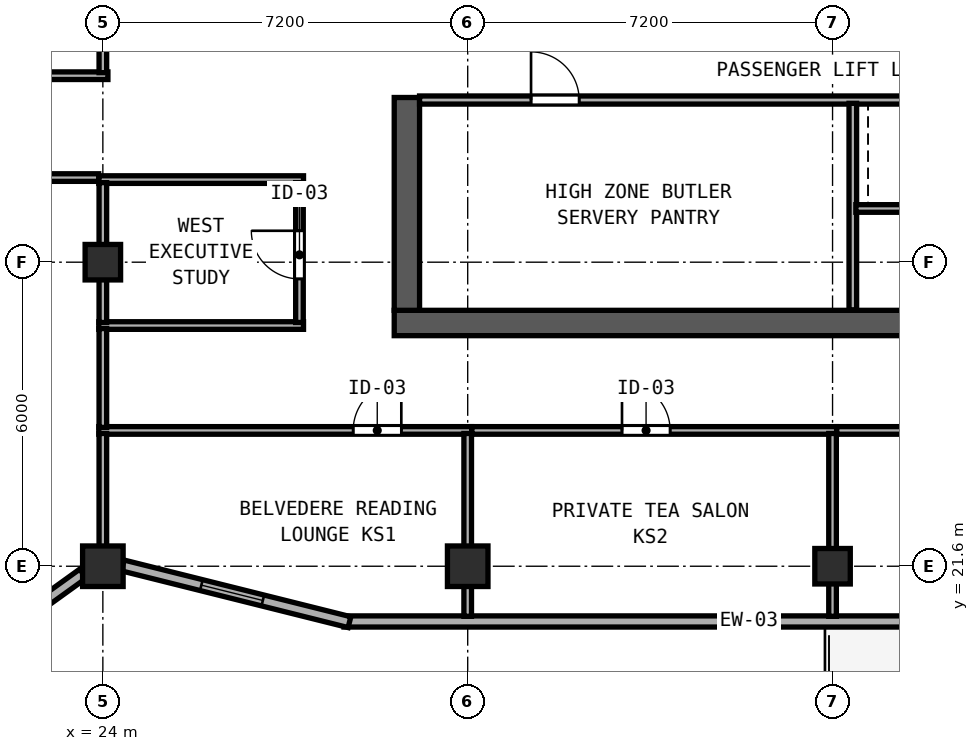
"""IFC4 building model, lengths in metres.
Left out: names, types, materials, properties, quantities, classifications, styles, units other than length and angle.
Written with IfcOpenShell. Run it as: python <this file> out.ifc"""

import sys

from ifc_helpers import new_model, si_unit, direction, frame, frame_2d, origin, origin_2d, place, context, subcontext, project, spatial, rectangle, hollow_rectangle, extrude, element, fill, save


model = new_model("IFC4")
c1 = context("Model", 3, precision=1e-05, world=origin(), true_north=direction((0.0, 1.0)))
c2 = subcontext(c1, "Body", "Model", "MODEL_VIEW")
j1 = project(units=[si_unit("LENGTHUNIT", "METRE"), si_unit("PLANEANGLEUNIT", "RADIAN")], contexts=[c1])
p1 = place(None, origin())
s1 = spatial("IfcSite", under=j1, at=p1, CompositionType="ELEMENT")
p2 = place(p1, origin())
s2 = spatial("IfcBuilding", under=s1, at=p2, CompositionType="ELEMENT")
p3 = place(p2, frame((0.0, 0.0, 235.2)))
s3 = spatial("IfcBuildingStorey", under=s2, at=p3, CompositionType="ELEMENT", Elevation=235.2)
p4 = place(p3, frame((29.75, 26.4, 0.0), z_axis=(0.0, 0.0, 1.0), x_axis=(1.0, 0.0, 0.0)))
e1 = element("IfcWall", 1, at=p4, inside=s3, PredefinedType="SHEAR", context=c2, shape_type="SweptSolid", body=[
    extrude(rectangle(XDim=17.3, YDim=0.5, at=frame_2d((8.65, 0.0))), origin(), (0.0, 0.0, 1.0), 3.67),
])
p5 = place(p4, frame((11.2, 0.0, 0.0), z_axis=(0.0, 0.0, 1.0), x_axis=(-1.0, 0.0, 0.0)))
e2 = element("IfcOpeningElement", 2, at=p5, cuts=e1, PredefinedType="OPENING", context=c2, shape_type="SweptSolid", body=[
    extrude(rectangle(XDim=0.9, YDim=2.1, at=frame_2d((0.45, 1.05))), frame((0.0, 0.26, 0.0), z_axis=(0.0, -1.0, 0.0), x_axis=(1.0, 0.0, 0.0)), (0.0, 0.0, 1.0), 0.52),
])
p6 = place(p3, frame((30.0, 26.65, 0.0), z_axis=(0.0, 0.0, 1.0), x_axis=(0.0, 1.0, 0.0)))
e3 = element("IfcWall", 3, at=p6, inside=s3, PredefinedType="SHEAR", context=c2, shape_type="SweptSolid", body=[
    extrude(rectangle(XDim=4.2, YDim=0.5, at=frame_2d((2.1, 0.0))), origin(), (0.0, 0.0, 1.0), 3.67),
])
for number, where, z_axis, x_axis in (
    (4, (24.0, 21.6, 0.0), (0.0, 0.0, 1.0), (1.0, 0.0, 0.0)),
    (5, (31.2, 21.6, 0.0), (0.0, 0.0, 1.0), (1.0, 0.0, 0.0)),
):
    element("IfcColumn", number, at=place(p3, frame(where, z_axis=z_axis, x_axis=x_axis)), inside=s3, PredefinedType="COLUMN", context=c2, shape_type="SweptSolid", body=[
        extrude(hollow_rectangle(XDim=0.8, YDim=0.8, WallThickness=0.03, at=origin_2d()), origin(), (0.0, 0.0, 1.0), 3.85),
    ])
for number, where, z_axis, x_axis in (
    (6, (24.0, 27.6, 0.0), (0.0, 0.0, 1.0), (1.0, 0.0, 0.0)),
    (7, (38.4, 21.6, 0.0), (0.0, 0.0, 1.0), (1.0, 0.0, 0.0)),
):
    element("IfcColumn", number, at=place(p3, frame(where, z_axis=z_axis, x_axis=x_axis)), inside=s3, PredefinedType="COLUMN", context=c2, shape_type="SweptSolid", body=[
        extrude(hollow_rectangle(XDim=0.7, YDim=0.7, WallThickness=0.026, at=origin_2d()), origin(), (0.0, 0.0, 1.0), 3.85),
    ])
p7 = place(p3, frame((28.759, 20.51, 0.0), z_axis=(0.0, 0.0, 1.0), x_axis=(1.0, 0.0, 0.0)))
e8 = element("IfcWall", 8, at=p7, inside=s3, PredefinedType="SOLIDWALL", context=c2, shape_type="SweptSolid", body=[
    extrude(rectangle(XDim=19.283, YDim=0.22, at=frame_2d((9.642, 0.0))), origin(), (0.0, 0.0, 1.0), 3.67),
])
p8 = place(p7, frame((15.641, 0.0, 0.0), z_axis=(0.0, 0.0, 1.0), x_axis=(-1.0, 0.0, 0.0)))
e9 = element("IfcOpeningElement", 9, at=p8, cuts=e8, PredefinedType="OPENING", context=c2, shape_type="SweptSolid", body=[
    extrude(rectangle(XDim=1.2, YDim=2.15, at=frame_2d((0.6, 1.075))), frame((0.0, 0.12, 0.0), z_axis=(0.0, -1.0, 0.0), x_axis=(1.0, 0.0, 0.0)), (0.0, 0.0, 1.0), 0.24),
])
p9 = place(p3, frame((14.065, 14.583, 0.0), z_axis=(0.0, 0.0, 1.0), x_axis=(0.811523708458, 0.584319493608, 0.0)))
e10 = element("IfcWall", 10, at=p9, inside=s3, PredefinedType="SOLIDWALL", context=c2, shape_type="SweptSolid", body=[
    extrude(rectangle(XDim=11.759, YDim=0.22, at=frame_2d((5.879, 0.0))), origin(), (0.0, 0.0, 1.0), 3.315),
])
p10 = place(p9, frame((1.6, 0.0, 0.85)))
e11 = element("IfcOpeningElement", 11, at=p10, cuts=e10, PredefinedType="OPENING", context=c2, shape_type="SweptSolid", body=[
    extrude(rectangle(XDim=1.25, YDim=1.95, at=frame_2d((0.625, 0.975))), frame((0.0, 0.12, 0.0), z_axis=(0.0, -1.0, 0.0), x_axis=(1.0, 0.0, 0.0)), (0.0, 0.0, 1.0), 0.24),
])
p11 = place(p9, frame((7.0, 0.0, 0.85)))
e12 = element("IfcOpeningElement", 12, at=p11, cuts=e10, PredefinedType="OPENING", context=c2, shape_type="SweptSolid", body=[
    extrude(rectangle(XDim=1.25, YDim=1.95, at=frame_2d((0.625, 0.975))), frame((0.0, 0.12, 0.0), z_axis=(0.0, -1.0, 0.0), x_axis=(1.0, 0.0, 0.0)), (0.0, 0.0, 1.0), 0.24),
])
p12 = place(p3, frame((24.392, 21.615, 0.0), z_axis=(0.0, 0.0, 1.0), x_axis=(0.970133159038, -0.242572986408, 0.0)))
e13 = element("IfcWall", 13, at=p12, inside=s3, PredefinedType="SOLIDWALL", context=c2, shape_type="SweptSolid", body=[
    extrude(rectangle(XDim=4.613, YDim=0.22, at=frame_2d((2.306, 0.0))), origin(), (0.0, 0.0, 1.0), 3.315),
])
p13 = place(p12, frame((1.6, 0.0, 0.85)))
e14 = element("IfcOpeningElement", 14, at=p13, cuts=e13, PredefinedType="OPENING", context=c2, shape_type="SweptSolid", body=[
    extrude(rectangle(XDim=1.25, YDim=1.95, at=frame_2d((0.625, 0.975))), frame((0.0, 0.12, 0.0), z_axis=(0.0, -1.0, 0.0), x_axis=(1.0, 0.0, 0.0)), (0.0, 0.0, 1.0), 0.24),
])
p14 = place(p3, frame((30.25, 30.8, 0.0), z_axis=(0.0, 0.0, 1.0), x_axis=(1.0, 0.0, 0.0)))
e15 = element("IfcWall", 15, at=p14, inside=s3, PredefinedType="SOLIDWALL", context=c2, shape_type="SweptSolid", body=[
    extrude(rectangle(XDim=16.3, YDim=0.16, at=frame_2d((8.15, 0.0))), origin(), (0.0, 0.0, 1.0), 3.67),
])
p15 = place(p14, frame((2.2, 0.0, 0.0)))
e16 = element("IfcOpeningElement", 16, at=p15, cuts=e15, PredefinedType="OPENING", context=c2, shape_type="SweptSolid", body=[
    extrude(rectangle(XDim=0.95, YDim=2.12, at=frame_2d((0.475, 1.06))), frame((0.0, 0.09, 0.0), z_axis=(0.0, -1.0, 0.0), x_axis=(1.0, 0.0, 0.0)), (0.0, 0.0, 1.0), 0.18),
])
p16 = place(p3, frame((38.8, 26.66, 0.0), z_axis=(0.0, 0.0, 1.0), x_axis=(0.0, 1.0, 0.0)))
e17 = element("IfcWall", 17, at=p16, inside=s3, PredefinedType="SOLIDWALL", context=c2, shape_type="SweptSolid", body=[
    extrude(rectangle(XDim=4.075, YDim=0.15, at=frame_2d((2.038, 0.0))), origin(), (0.0, 0.0, 1.0), 3.67),
])
p17 = place(p3, frame((38.86, 28.66, 0.0), z_axis=(0.0, 0.0, 1.0), x_axis=(1.0, 0.0, 0.0)))
e18 = element("IfcWall", 18, at=p17, inside=s3, PredefinedType="PARTITIONING", context=c2, shape_type="SweptSolid", body=[
    extrude(rectangle(XDim=7.69, YDim=0.15, at=frame_2d((3.845, 0.0))), origin(), (0.0, 0.0, 1.0), 3.67),
])
for number, where, z_axis, x_axis in (
    (19, (23.92, 29.23, 0.0), (0.0, 0.0, 1.0), (1.0, 0.0, 0.0)),
    (20, (23.92, 26.35, 0.0), (0.0, 0.0, 1.0), (1.0, 0.0, 0.0)),
):
    element("IfcWall", number, at=place(p3, frame(where, z_axis=z_axis, x_axis=x_axis)), inside=s3, PredefinedType="PARTITIONING", context=c2, shape_type="SweptSolid", body=[
        extrude(rectangle(XDim=4.04, YDim=0.15, at=frame_2d((2.02, 0.0))), origin(), (0.0, 0.0, 1.0), 3.67),
    ])
p18 = place(p3, frame((24.0, 26.41, 0.0), z_axis=(0.0, 0.0, 1.0), x_axis=(0.0, 1.0, 0.0)))
e21 = element("IfcWall", 21, at=p18, inside=s3, PredefinedType="PARTITIONING", context=c2, shape_type="SweptSolid", body=[
    extrude(rectangle(XDim=2.76, YDim=0.15, at=frame_2d((1.38, 0.0))), origin(), (0.0, 0.0, 1.0), 3.315),
])
p19 = place(p3, frame((27.88, 26.41, 0.0), z_axis=(0.0, 0.0, 1.0), x_axis=(0.0, 1.0, 0.0)))
e22 = element("IfcWall", 22, at=p19, inside=s3, PredefinedType="PARTITIONING", context=c2, shape_type="SweptSolid", body=[
    extrude(rectangle(XDim=2.76, YDim=0.15, at=frame_2d((1.38, 0.0))), origin(), (0.0, 0.0, 1.0), 3.67),
])
p20 = place(p19, frame((1.81, 0.0, 0.0), z_axis=(0.0, 0.0, 1.0), x_axis=(-1.0, 0.0, 0.0)))
e23 = element("IfcOpeningElement", 23, at=p20, cuts=e22, PredefinedType="OPENING", context=c2, shape_type="SweptSolid", body=[
    extrude(rectangle(XDim=0.95, YDim=2.12, at=frame_2d((0.475, 1.06))), frame((0.0, 0.085, 0.0), z_axis=(0.0, -1.0, 0.0), x_axis=(1.0, 0.0, 0.0)), (0.0, 0.0, 1.0), 0.17),
])
p21 = place(p3, frame((23.92, 24.28, 0.0), z_axis=(0.0, 0.0, 1.0), x_axis=(1.0, 0.0, 0.0)))
e24 = element("IfcWall", 24, at=p21, inside=s3, PredefinedType="PARTITIONING", context=c2, shape_type="SweptSolid", body=[
    extrude(rectangle(XDim=7.36, YDim=0.15, at=frame_2d((3.68, 0.0))), origin(), (0.0, 0.0, 1.0), 3.67),
])
p22 = place(p21, frame((5.97, 0.0, 0.0), z_axis=(0.0, 0.0, 1.0), x_axis=(-1.0, 0.0, 0.0)))
e25 = element("IfcOpeningElement", 25, at=p22, cuts=e24, PredefinedType="OPENING", context=c2, shape_type="SweptSolid", body=[
    extrude(rectangle(XDim=0.95, YDim=2.12, at=frame_2d((0.475, 1.06))), frame((0.0, 0.085, 0.0), z_axis=(0.0, -1.0, 0.0), x_axis=(1.0, 0.0, 0.0)), (0.0, 0.0, 1.0), 0.17),
])
p23 = place(p3, frame((24.0, 21.819, 0.0), z_axis=(0.0, 0.0, 1.0), x_axis=(0.0, 1.0, 0.0)))
e26 = element("IfcWall", 26, at=p23, inside=s3, PredefinedType="PARTITIONING", context=c2, shape_type="SweptSolid", body=[
    extrude(rectangle(XDim=2.401, YDim=0.15, at=frame_2d((1.201, 0.0))), origin(), (0.0, 0.0, 1.0), 3.315),
])
p24 = place(p3, frame((31.2, 20.612, 0.0), z_axis=(0.0, 0.0, 1.0), x_axis=(0.0, 1.0, 0.0)))
e27 = element("IfcWall", 27, at=p24, inside=s3, PredefinedType="PARTITIONING", context=c2, shape_type="SweptSolid", body=[
    extrude(rectangle(XDim=3.608, YDim=0.15, at=frame_2d((1.804, 0.0))), origin(), (0.0, 0.0, 1.0), 3.155),
])
p25 = place(p3, frame((31.282, 24.28, 0.0), z_axis=(0.0, 0.0, 1.0), x_axis=(1.0, 0.0, 0.0)))
e28 = element("IfcWall", 28, at=p25, inside=s3, PredefinedType="PARTITIONING", context=c2, shape_type="SweptSolid", body=[
    extrude(rectangle(XDim=7.198, YDim=0.15, at=frame_2d((3.599, 0.0))), origin(), (0.0, 0.0, 1.0), 3.67),
])
p26 = place(p25, frame((3.913, 0.0, 0.0), z_axis=(0.0, 0.0, 1.0), x_axis=(-1.0, 0.0, 0.0)))
e29 = element("IfcOpeningElement", 29, at=p26, cuts=e28, PredefinedType="OPENING", context=c2, shape_type="SweptSolid", body=[
    extrude(rectangle(XDim=0.95, YDim=2.12, at=frame_2d((0.475, 1.06))), frame((0.0, 0.085, 0.0), z_axis=(0.0, -1.0, 0.0), x_axis=(1.0, 0.0, 0.0)), (0.0, 0.0, 1.0), 0.17),
])
p27 = place(p3, frame((38.4, 20.612, 0.0), z_axis=(0.0, 0.0, 1.0), x_axis=(0.0, 1.0, 0.0)))
e30 = element("IfcWall", 30, at=p27, inside=s3, PredefinedType="PARTITIONING", context=c2, shape_type="SweptSolid", body=[
    extrude(rectangle(XDim=3.608, YDim=0.15, at=frame_2d((1.804, 0.0))), origin(), (0.0, 0.0, 1.0), 3.155),
])
p28 = place(p3, frame((38.482, 24.28, 0.0), z_axis=(0.0, 0.0, 1.0), x_axis=(1.0, 0.0, 0.0)))
e31 = element("IfcWall", 31, at=p28, inside=s3, PredefinedType="PARTITIONING", context=c2, shape_type="SweptSolid", body=[
    extrude(rectangle(XDim=7.198, YDim=0.15, at=frame_2d((3.599, 0.0))), origin(), (0.0, 0.0, 1.0), 3.67),
])
p29 = place(p28, frame((3.913, 0.0, 0.0), z_axis=(0.0, 0.0, 1.0), x_axis=(-1.0, 0.0, 0.0)))
e32 = element("IfcOpeningElement", 32, at=p29, cuts=e31, PredefinedType="OPENING", context=c2, shape_type="SweptSolid", body=[
    extrude(rectangle(XDim=0.95, YDim=2.12, at=frame_2d((0.475, 1.06))), frame((0.0, 0.085, 0.0), z_axis=(0.0, -1.0, 0.0), x_axis=(1.0, 0.0, 0.0)), (0.0, 0.0, 1.0), 0.17),
])
p30 = place(p3, frame((18.312, 31.28, 0.0), z_axis=(0.0, 0.0, 1.0), x_axis=(1.0, 0.0, 0.0)))
e33 = element("IfcWall", 33, at=p30, inside=s3, PredefinedType="PARTITIONING", context=c2, shape_type="SweptSolid", body=[
    extrude(rectangle(XDim=5.788, YDim=0.15, at=frame_2d((2.894, 0.0))), origin(), (0.0, 0.0, 1.0), 3.67),
])
p31 = place(p30, frame((0.14, 0.0, 0.0)))
e34 = element("IfcOpeningElement", 34, at=p31, cuts=e33, PredefinedType="OPENING", context=c2, shape_type="SweptSolid", body=[
    extrude(rectangle(XDim=0.95, YDim=2.18, at=frame_2d((0.475, 1.09))), frame((0.0, 0.085, 0.0), z_axis=(0.0, -1.0, 0.0), x_axis=(1.0, 0.0, 0.0)), (0.0, 0.0, 1.0), 0.17),
])
p32 = place(p3, frame((24.0, 31.34, 0.0), z_axis=(0.0, 0.0, 1.0), x_axis=(0.0, 1.0, 0.0)))
e35 = element("IfcWall", 35, at=p32, inside=s3, PredefinedType="PARTITIONING", context=c2, shape_type="SweptSolid", body=[
    extrude(rectangle(XDim=1.6, YDim=0.15, at=frame_2d((0.8, 0.0))), origin(), (0.0, 0.0, 1.0), 3.315),
])
p33 = place(p3, frame((18.312, 29.27, 0.0), z_axis=(0.0, 0.0, 1.0), x_axis=(1.0, 0.0, 0.0)))
e36 = element("IfcWall", 36, at=p33, inside=s3, PredefinedType="PARTITIONING", context=c2, shape_type="SweptSolid", body=[
    extrude(rectangle(XDim=5.606, YDim=0.15, at=frame_2d((2.803, 0.0))), origin(), (0.0, 0.0, 1.0), 3.67),
])
p34 = place(p33, frame((1.09, 0.0, 0.0), z_axis=(0.0, 0.0, 1.0), x_axis=(-1.0, 0.0, 0.0)))
e37 = element("IfcOpeningElement", 37, at=p34, cuts=e36, PredefinedType="OPENING", context=c2, shape_type="SweptSolid", body=[
    extrude(rectangle(XDim=0.95, YDim=2.15, at=frame_2d((0.475, 1.075))), frame((0.0, 0.085, 0.0), z_axis=(0.0, -1.0, 0.0), x_axis=(1.0, 0.0, 0.0)), (0.0, 0.0, 1.0), 0.17),
])
p35 = place(p3, frame((24.0, 24.34, 0.0), z_axis=(0.0, 0.0, 1.0), x_axis=(0.0, 1.0, 0.0)))
e38 = element("IfcWall", 38, at=p35, inside=s3, PredefinedType="PARTITIONING", context=c2, shape_type="SweptSolid", body=[
    extrude(rectangle(XDim=1.95, YDim=0.15, at=frame_2d((0.975, 0.0))), origin(), (0.0, 0.0, 1.0), 3.315),
])
p36 = place(p13, origin())
e39 = element("IfcWindow", 39, at=p36, inside=s3, PartitioningType="SINGLE_PANEL", PredefinedType="WINDOW", context=c2, shape_type="SweptSolid", body=[
    extrude(rectangle(XDim=1.25, YDim=1.95, at=frame_2d((0.625, 0.975))), frame((0.0, 0.03, 0.0), z_axis=(0.0, -1.0, 0.0), x_axis=(1.0, 0.0, 0.0)), (0.0, 0.0, 1.0), 0.06),
])
fill(e14, e39)
p37 = place(p15, origin())
e40 = element("IfcDoor", 40, at=p37, inside=s3, OperationType="SINGLE_SWING_LEFT", PredefinedType="DOOR", context=c2, shape_type="SweptSolid", body=[
    extrude(rectangle(XDim=0.95, YDim=2.12, at=frame_2d((0.475, 1.06))), frame((0.0, 0.025, 0.0), z_axis=(0.0, -1.0, 0.0), x_axis=(1.0, 0.0, 0.0)), (0.0, 0.0, 1.0), 0.05),
])
fill(e16, e40)
p38 = place(p20, origin())
e41 = element("IfcDoor", 41, at=p38, inside=s3, OperationType="SINGLE_SWING_LEFT", PredefinedType="DOOR", context=c2, shape_type="SweptSolid", body=[
    extrude(rectangle(XDim=0.95, YDim=2.12, at=frame_2d((0.475, 1.06))), frame((0.0, 0.025, 0.0), z_axis=(0.0, -1.0, 0.0), x_axis=(1.0, 0.0, 0.0)), (0.0, 0.0, 1.0), 0.05),
])
fill(e23, e41)
p39 = place(p22, origin())
e42 = element("IfcDoor", 42, at=p39, inside=s3, OperationType="SINGLE_SWING_LEFT", PredefinedType="DOOR", context=c2, shape_type="SweptSolid", body=[
    extrude(rectangle(XDim=0.95, YDim=2.12, at=frame_2d((0.475, 1.06))), frame((0.0, 0.025, 0.0), z_axis=(0.0, -1.0, 0.0), x_axis=(1.0, 0.0, 0.0)), (0.0, 0.0, 1.0), 0.05),
])
fill(e25, e42)
p40 = place(p26, origin())
e43 = element("IfcDoor", 43, at=p40, inside=s3, OperationType="SINGLE_SWING_RIGHT", PredefinedType="DOOR", context=c2, shape_type="SweptSolid", body=[
    extrude(rectangle(XDim=0.95, YDim=2.12, at=frame_2d((0.475, 1.06))), frame((0.0, 0.025, 0.0), z_axis=(0.0, -1.0, 0.0), x_axis=(1.0, 0.0, 0.0)), (0.0, 0.0, 1.0), 0.05),
])
fill(e29, e43)
save(model, sys.argv[1])
